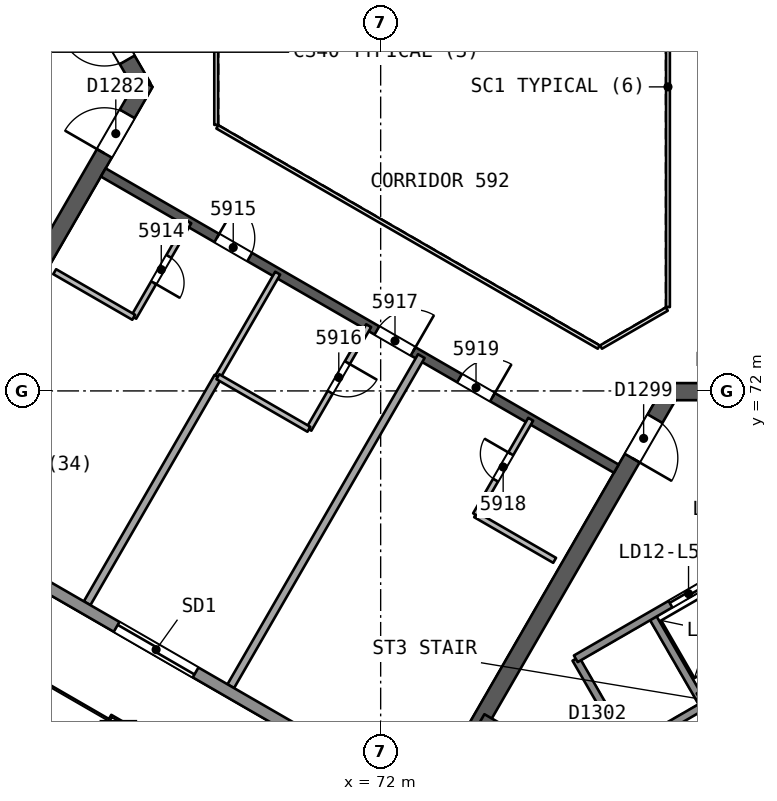
"""IFC4 building model, lengths in metres.
Left out: names, types, materials, properties, quantities, classifications, styles, units other than length and angle.
Written with IfcOpenShell. Run it as: python <this file> out.ifc"""

import sys

from ifc_helpers import new_model, si_unit, direction, frame, frame_2d, origin, origin_2d, place, context, subcontext, project, spatial, rectangle, extrude, element, fill, save


model = new_model("IFC4")
c1 = context("Model", 3, precision=1e-05, world=origin(), true_north=direction((0.0, 1.0)))
c2 = subcontext(c1, "Body", "Model", "MODEL_VIEW")
j1 = project(units=[si_unit("LENGTHUNIT", "METRE"), si_unit("PLANEANGLEUNIT", "RADIAN")], contexts=[c1])
p1 = place(None, origin())
s1 = spatial("IfcSite", under=j1, at=p1, CompositionType="ELEMENT")
p2 = place(p1, origin())
s2 = spatial("IfcBuilding", under=s1, at=p2, CompositionType="ELEMENT")
p3 = place(p2, frame((0.0, 0.0, 239.1)))
s3 = spatial("IfcBuildingStorey", under=s2, at=p3, CompositionType="ELEMENT", Elevation=239.1)
p4 = place(p3, frame((65.74, 80.0, 0.0), z_axis=(0.0, 0.0, 1.0), x_axis=(-0.499991857942, 0.866030104553, 0.0)))
e1 = element("IfcWall", 1, at=p4, inside=s3, PredefinedType="SHEAR", context=c2, shape_type="SweptSolid", body=[
    extrude(rectangle(XDim=10.25, YDim=0.45, at=frame_2d((5.125, 0.0))), origin(), (0.0, 0.0, 1.0), 3.7),
])
p5 = place(p4, frame((0.82, 0.0, 0.0)))
e2 = element("IfcOpeningElement", 2, at=p5, cuts=e1, PredefinedType="OPENING", context=c2, shape_type="SweptSolid", body=[
    extrude(rectangle(XDim=1.2, YDim=2.1, at=frame_2d((0.6, 1.05))), frame((0.0, 0.235, 0.0), z_axis=(0.0, -1.0, 0.0), x_axis=(1.0, 0.0, 0.0)), (0.0, 0.0, 1.0), 0.471),
])
p6 = place(p3, frame((60.728, 71.318, 0.0), z_axis=(0.0, 0.0, 1.0), x_axis=(0.500012416173, 0.866018235185, 0.0)))
e3 = element("IfcWall", 3, at=p6, inside=s3, PredefinedType="SHEAR", context=c2, shape_type="SweptSolid", body=[
    extrude(rectangle(XDim=10.155, YDim=0.45, at=frame_2d((5.078, 0.0))), origin(), (0.0, 0.0, 1.0), 3.7),
])
p7 = place(p6, frame((8.005, 0.0, 0.0)))
e4 = element("IfcOpeningElement", 4, at=p7, cuts=e3, PredefinedType="OPENING", context=c2, shape_type="SweptSolid", body=[
    extrude(rectangle(XDim=1.2, YDim=2.1, at=frame_2d((0.6, 1.05))), frame((0.0, 0.235, 0.0), z_axis=(0.0, -1.0, 0.0), x_axis=(1.0, 0.0, 0.0)), (0.0, 0.0, 1.0), 0.471),
])
p8 = place(p3, frame((79.63, 71.981, 0.0), z_axis=(0.0, 0.0, 1.0), x_axis=(-0.500002171595, -0.86602415001, 0.0)))
e5 = element("IfcWall", 5, at=p8, inside=s3, PredefinedType="SHEAR", context=c2, shape_type="SweptSolid", body=[
    extrude(rectangle(XDim=10.25, YDim=0.45, at=frame_2d((5.125, 0.0))), origin(), (0.0, 0.0, 1.0), 3.7),
])
p9 = place(p8, frame((0.82, 0.0, 0.0)))
e6 = element("IfcOpeningElement", 6, at=p9, cuts=e5, PredefinedType="OPENING", context=c2, shape_type="SweptSolid", body=[
    extrude(rectangle(XDim=1.2, YDim=2.1, at=frame_2d((0.6, 1.05))), frame((0.0, 0.235, 0.0), z_axis=(0.0, -1.0, 0.0), x_axis=(1.0, 0.0, 0.0)), (0.0, 0.0, 1.0), 0.471),
])
p10 = place(p3, frame((74.617, 63.299, 0.0), z_axis=(0.0, 0.0, 1.0), x_axis=(0.86602594008, -0.499999071108, 0.0)))
e7 = element("IfcWall", 7, at=p10, inside=s3, PredefinedType="SHEAR", context=c2, shape_type="SweptSolid", body=[
    extrude(rectangle(XDim=14.108, YDim=0.45, at=frame_2d((7.054, 0.0))), origin(), (0.0, 0.0, 1.0), 3.7),
])
p11 = place(p3, frame((89.655, 71.981, 0.0), z_axis=(0.0, 0.0, 1.0), x_axis=(-1.0, 0.0, 0.0)))
e8 = element("IfcWall", 8, at=p11, inside=s3, PredefinedType="SHEAR", context=c2, shape_type="SweptSolid", body=[
    extrude(rectangle(XDim=10.155, YDim=0.45, at=frame_2d((5.078, 0.0))), origin(), (0.0, 0.0, 1.0), 3.7),
])
p12 = place(p11, frame((8.005, 0.0, 0.0)))
e9 = element("IfcOpeningElement", 9, at=p12, cuts=e8, PredefinedType="OPENING", context=c2, shape_type="SweptSolid", body=[
    extrude(rectangle(XDim=1.2, YDim=2.1, at=frame_2d((0.6, 1.05))), frame((0.0, 0.235, 0.0), z_axis=(0.0, -1.0, 0.0), x_axis=(1.0, 0.0, 0.0)), (0.0, 0.0, 1.0), 0.471),
])
p13 = place(p3, frame((64.7, 77.748, 0.0), z_axis=(0.0, 0.0, 1.0), x_axis=(0.866026492143, -0.499998114903, 0.0)))
e10 = element("IfcWall", 10, at=p13, inside=s3, PredefinedType="SHEAR", context=c2, shape_type="SweptSolid", body=[
    extrude(rectangle(XDim=15.588, YDim=0.25, at=frame_2d((7.794, 0.0))), origin(), (0.0, 0.0, 1.0), 3.3),
])
p14 = place(p13, frame((3.45, 0.0, 0.0)))
e11 = element("IfcOpeningElement", 11, at=p14, cuts=e10, PredefinedType="OPENING", context=c2, shape_type="SweptSolid", body=[
    extrude(rectangle(XDim=1.0, YDim=2.1, at=frame_2d((0.5, 1.05))), frame((0.0, 0.135, 0.0), z_axis=(0.0, -1.0, 0.0), x_axis=(1.0, 0.0, 0.0)), (0.0, 0.0, 1.0), 0.271),
])
p15 = place(p13, frame((8.315, 0.0, 0.0)))
e12 = element("IfcOpeningElement", 12, at=p15, cuts=e10, PredefinedType="OPENING", context=c2, shape_type="SweptSolid", body=[
    extrude(rectangle(XDim=1.1, YDim=2.1, at=frame_2d((0.55, 1.05))), frame((0.0, 0.135, 0.0), z_axis=(0.0, -1.0, 0.0), x_axis=(1.0, 0.0, 0.0)), (0.0, 0.0, 1.0), 0.271),
])
p16 = place(p13, frame((10.827, 0.0, 0.0)))
e13 = element("IfcOpeningElement", 13, at=p16, cuts=e10, PredefinedType="OPENING", context=c2, shape_type="SweptSolid", body=[
    extrude(rectangle(XDim=1.0, YDim=2.1, at=frame_2d((0.5, 1.05))), frame((0.0, 0.135, 0.0), z_axis=(0.0, -1.0, 0.0), x_axis=(1.0, 0.0, 0.0)), (0.0, 0.0, 1.0), 0.271),
])
p17 = place(p3, frame((65.086, 62.828, 0.0), z_axis=(0.010093620709, 0.017482414954, 0.999796221231), x_axis=(-0.866022643586, 0.500004780773, 1.3036e-08)))
e14 = element("IfcColumn", 14, at=p17, inside=s3, PredefinedType="COLUMN", context=c2, shape_type="SweptSolid", body=[
    extrude(rectangle(XDim=0.85, YDim=0.85, at=origin_2d()), origin(), (0.0, 0.0, 1.0), 3.701),
])
p18 = place(p3, frame((66.952, 76.448, 0.0), z_axis=(0.0, 0.0, 1.0), x_axis=(-0.499987231761, -0.866032775405, 0.0)))
e15 = element("IfcWall", 15, at=p18, inside=s3, PredefinedType="PARTITIONING", context=c2, shape_type="SweptSolid", body=[
    extrude(rectangle(XDim=2.9, YDim=0.15, at=frame_2d((1.45, 0.0))), origin(), (0.0, 0.0, 1.0), 3.3),
])
p19 = place(p18, frame((1.05, 0.0, 0.0)))
e16 = element("IfcOpeningElement", 16, at=p19, cuts=e15, PredefinedType="OPENING", context=c2, shape_type="SweptSolid", body=[
    extrude(rectangle(XDim=0.8, YDim=2.1, at=frame_2d((0.4, 1.05))), frame((0.0, 0.085, 0.0), z_axis=(0.0, -1.0, 0.0), x_axis=(1.0, 0.0, 0.0)), (0.0, 0.0, 1.0), 0.171),
])
p20 = place(p3, frame((65.502, 73.937, 0.0), z_axis=(0.0, 0.0, 1.0), x_axis=(-0.865994240961, 0.500053971709, 0.0)))
e17 = element("IfcWall", 17, at=p20, inside=s3, PredefinedType="PARTITIONING", context=c2, shape_type="SweptSolid", body=[
    extrude(rectangle(XDim=2.401, YDim=0.15, at=frame_2d((1.201, 0.0))), origin(), (0.0, 0.0, 1.0), 3.3),
])
p21 = place(p3, frame((64.275, 66.413, 0.0), z_axis=(0.0, 0.0, 1.0), x_axis=(0.500015178307, 0.866016640408, 0.0)))
e18 = element("IfcWall", 18, at=p21, inside=s3, PredefinedType="PARTITIONING", context=c2, shape_type="SweptSolid", body=[
    extrude(rectangle(XDim=6.883, YDim=0.2, at=frame_2d((3.441, 0.0))), origin(), (0.0, 0.0, 1.0), 3.3),
])
p22 = place(p3, frame((67.717, 72.373, 0.0), z_axis=(0.0, 0.0, 1.0), x_axis=(0.500002266011, 0.866024095498, 0.0)))
e19 = element("IfcWall", 19, at=p22, inside=s3, PredefinedType="PARTITIONING", context=c2, shape_type="SweptSolid", body=[
    extrude(rectangle(XDim=3.147, YDim=0.15, at=frame_2d((1.573, 0.0))), origin(), (0.0, 0.0, 1.0), 3.3),
])
p23 = place(p3, frame((71.684, 73.716, 0.0), z_axis=(0.0, 0.0, 1.0), x_axis=(-0.499977671647, -0.866038294681, 0.0)))
e20 = element("IfcWall", 20, at=p23, inside=s3, PredefinedType="PARTITIONING", context=c2, shape_type="SweptSolid", body=[
    extrude(rectangle(XDim=3.147, YDim=0.15, at=frame_2d((1.573, 0.0))), origin(), (0.0, 0.0, 1.0), 3.3),
])
p24 = place(p23, frame((1.123, 0.0, 0.0)))
e21 = element("IfcOpeningElement", 21, at=p24, cuts=e20, PredefinedType="OPENING", context=c2, shape_type="SweptSolid", body=[
    extrude(rectangle(XDim=0.9, YDim=2.1, at=frame_2d((0.45, 1.05))), frame((0.0, 0.085, 0.0), z_axis=(0.0, -1.0, 0.0), x_axis=(1.0, 0.0, 0.0)), (0.0, 0.0, 1.0), 0.171),
])
p25 = place(p3, frame((70.111, 70.991, 0.0), z_axis=(0.0, 0.0, 1.0), x_axis=(-0.866050310653, 0.499956857557, 0.0)))
e22 = element("IfcWall", 22, at=p25, inside=s3, PredefinedType="PARTITIONING", context=c2, shape_type="SweptSolid", body=[
    extrude(rectangle(XDim=2.765, YDim=0.15, at=frame_2d((1.382, 0.0))), origin(), (0.0, 0.0, 1.0), 3.3),
])
p26 = place(p3, frame((68.055, 64.23, 0.0), z_axis=(0.0, 0.0, 1.0), x_axis=(0.50001112685, 0.866018979599, 0.0)))
e23 = element("IfcWall", 23, at=p26, inside=s3, PredefinedType="PARTITIONING", context=c2, shape_type="SweptSolid", body=[
    extrude(rectangle(XDim=10.03, YDim=0.2, at=frame_2d((5.015, 0.0))), origin(), (0.0, 0.0, 1.0), 3.3),
])
p27 = place(p3, frame((76.578, 67.542, 0.0), z_axis=(0.0, 0.0, 1.0), x_axis=(-0.866038271014, 0.499977712642, 0.0)))
e24 = element("IfcWall", 24, at=p27, inside=s3, PredefinedType="PARTITIONING", context=c2, shape_type="SweptSolid", body=[
    extrude(rectangle(XDim=2.401, YDim=0.15, at=frame_2d((1.2, 0.0))), origin(), (0.0, 0.0, 1.0), 3.3),
])
p28 = place(p3, frame((74.498, 68.743, 0.0), z_axis=(0.0, 0.0, 1.0), x_axis=(0.499987231761, 0.866032775405, 0.0)))
e25 = element("IfcWall", 25, at=p28, inside=s3, PredefinedType="PARTITIONING", context=c2, shape_type="SweptSolid", body=[
    extrude(rectangle(XDim=2.9, YDim=0.15, at=frame_2d((1.45, 0.0))), origin(), (0.0, 0.0, 1.0), 3.3),
])
p29 = place(p28, frame((1.05, 0.0, 0.0)))
e26 = element("IfcOpeningElement", 26, at=p29, cuts=e25, PredefinedType="OPENING", context=c2, shape_type="SweptSolid", body=[
    extrude(rectangle(XDim=0.8, YDim=2.1, at=frame_2d((0.4, 1.05))), frame((0.0, 0.085, 0.0), z_axis=(0.0, -1.0, 0.0), x_axis=(1.0, 0.0, 0.0)), (0.0, 0.0, 1.0), 0.171),
])
p30 = place(p3, frame((87.876, 52.614, 0.0), z_axis=(0.0, 0.0, 1.0), x_axis=(-0.866025459945, 0.499999902727, 0.0)))
e27 = element("IfcWall", 27, at=p30, inside=s3, PredefinedType="SOLIDWALL", context=c2, shape_type="SweptSolid", body=[
    extrude(rectangle(XDim=49.688, YDim=0.3, at=frame_2d((24.844, 0.0))), origin(), (0.0, 0.0, 1.0), 3.3),
])
p31 = place(p30, frame((23.956, 0.0, 0.0)))
e28 = element("IfcOpeningElement", 28, at=p31, cuts=e27, PredefinedType="OPENING", context=c2, shape_type="SweptSolid", body=[
    extrude(rectangle(XDim=2.4, YDim=2.4, at=frame_2d((1.2, 1.2))), frame((0.0, 0.161, 0.0), z_axis=(0.0, -1.0, 0.0), x_axis=(1.0, 0.0, 0.0)), (0.0, 0.0, 1.0), 0.321),
])
p32 = place(p30, frame((37.357, 0.0, 0.0)))
e29 = element("IfcOpeningElement", 29, at=p32, cuts=e27, PredefinedType="OPENING", context=c2, shape_type="SweptSolid", body=[
    extrude(rectangle(XDim=2.4, YDim=2.4, at=frame_2d((1.2, 1.2))), frame((0.0, 0.161, 0.0), z_axis=(0.0, -1.0, 0.0), x_axis=(1.0, 0.0, 0.0)), (0.0, 0.0, 1.0), 0.321),
])
p33 = place(p30, frame((10.243, 0.0, 0.0)))
e30 = element("IfcOpeningElement", 30, at=p33, cuts=e27, PredefinedType="OPENING", context=c2, shape_type="SweptSolid", body=[
    extrude(rectangle(XDim=2.4, YDim=2.4, at=frame_2d((1.2, 1.2))), frame((0.0, 0.161, 0.0), z_axis=(0.0, -1.0, 0.0), x_axis=(1.0, 0.0, 0.0)), (0.0, 0.0, 1.0), 0.321),
])
for number, where, z_axis, x_axis in (
    (31, (77.135, 64.952, 0.0), (0.0, 0.0, 1.0), (0.5, -0.866, 0.0)),
    (32, (79.127, 66.102, 0.0), (0.0, 0.0, 1.0), (0.5, -0.866, 0.0)),
):
    element("IfcWall", number, at=place(p3, frame(where, z_axis=z_axis, x_axis=x_axis)), inside=s3, PredefinedType="SOLIDWALL", context=c2, shape_type="SweptSolid", body=[
        extrude(rectangle(XDim=2.75, YDim=0.2, at=frame_2d((1.375, 0.0))), origin(), (0.0, 0.0, 1.0), 3.3),
    ])
p34 = place(p3, frame((77.135, 64.952, 0.0), z_axis=(0.0, 0.0, 1.0), x_axis=(0.866031916153, 0.499988720078, 0.0)))
e33 = element("IfcWall", 33, at=p34, inside=s3, PredefinedType="SOLIDWALL", context=c2, shape_type="SweptSolid", body=[
    extrude(rectangle(XDim=11.35, YDim=0.2, at=frame_2d((5.675, 0.0))), origin(), (0.0, 0.0, 1.0), 3.3),
])
p35 = place(p34, frame((2.875, 0.0, 0.0)))
e34 = element("IfcOpeningElement", 34, at=p35, cuts=e33, PredefinedType="OPENING", context=c2, shape_type="SweptSolid", body=[
    extrude(rectangle(XDim=1.1, YDim=2.1, at=frame_2d((0.55, 1.05))), frame((0.0, 0.11, 0.0), z_axis=(0.0, -1.0, 0.0), x_axis=(1.0, 0.0, 0.0)), (0.0, 0.0, 1.0), 0.221),
])
p36 = place(p34, frame((5.125, 0.0, 0.0)))
e35 = element("IfcOpeningElement", 35, at=p36, cuts=e33, PredefinedType="OPENING", context=c2, shape_type="SweptSolid", body=[
    extrude(rectangle(XDim=1.1, YDim=2.1, at=frame_2d((0.55, 1.05))), frame((0.0, 0.11, 0.0), z_axis=(0.0, -1.0, 0.0), x_axis=(1.0, 0.0, 0.0)), (0.0, 0.0, 1.0), 0.221),
])
p37 = place(p34, frame((7.375, 0.0, 0.0)))
e36 = element("IfcOpeningElement", 36, at=p37, cuts=e33, PredefinedType="OPENING", context=c2, shape_type="SweptSolid", body=[
    extrude(rectangle(XDim=1.1, YDim=2.1, at=frame_2d((0.55, 1.05))), frame((0.0, 0.11, 0.0), z_axis=(0.0, -1.0, 0.0), x_axis=(1.0, 0.0, 0.0)), (0.0, 0.0, 1.0), 0.221),
])
p38 = place(p3, frame((80.367, 63.954, 0.0), z_axis=(0.0, 0.0, 1.0), x_axis=(0.866026575979, 0.499997969693, 0.0)))
e37 = element("IfcWall", 37, at=p38, inside=s3, PredefinedType="SOLIDWALL", context=c2, shape_type="SweptSolid", body=[
    extrude(rectangle(XDim=6.75, YDim=0.2, at=frame_2d((3.375, 0.0))), origin(), (0.0, 0.0, 1.0), 3.3),
])
p39 = place(p3, frame((78.51, 62.57, 0.0), z_axis=(0.0, 0.0, 1.0), x_axis=(0.866053019151, 0.499952165731, 0.0)))
e38 = element("IfcWall", 38, at=p39, inside=s3, PredefinedType="SOLIDWALL", context=c2, shape_type="SweptSolid", body=[
    extrude(rectangle(XDim=2.3, YDim=0.2, at=frame_2d((1.15, 0.0))), origin(), (0.0, 0.0, 1.0), 3.3),
])
p40 = place(p3, frame((79.56, 74.206, 0.0), z_axis=(0.0, 0.0, 1.0), x_axis=(0.0, 1.0, 0.0)))
e39 = element("IfcWall", 39, at=p40, inside=s3, PredefinedType="PARTITIONING", context=c2, shape_type="SweptSolid", body=[
    extrude(rectangle(XDim=11.588, YDim=0.1, at=frame_2d((5.794, 0.0))), origin(), (0.0, 0.0, 1.0), 3.3),
])
p41 = place(p3, frame((67.672, 81.0, 0.0), z_axis=(0.0, 0.0, 1.0), x_axis=(0.0, -1.0, 0.0)))
e40 = element("IfcWall", 40, at=p41, inside=s3, PredefinedType="PARTITIONING", context=c2, shape_type="SweptSolid", body=[
    extrude(rectangle(XDim=2.0, YDim=0.1, at=frame_2d((1.0, 0.0))), origin(), (0.0, 0.0, 1.0), 3.3),
])
p42 = place(p3, frame((67.702, 78.948, 0.0), z_axis=(0.0, 0.0, 1.0), x_axis=(0.866026658274, -0.499997827154, 0.0)))
e41 = element("IfcWall", 41, at=p42, inside=s3, PredefinedType="PARTITIONING", context=c2, shape_type="SweptSolid", body=[
    extrude(rectangle(XDim=11.588, YDim=0.1, at=frame_2d((5.794, 0.0))), origin(), (0.0, 0.0, 1.0), 3.3),
])
p43 = place(p3, frame((77.798, 73.154, 0.0), z_axis=(0.0, 0.0, 1.0), x_axis=(0.866041268327, 0.499972520799, 0.0)))
e42 = element("IfcWall", 42, at=p43, inside=s3, PredefinedType="PARTITIONING", context=c2, shape_type="SweptSolid", body=[
    extrude(rectangle(XDim=2.0, YDim=0.1, at=frame_2d((1.0, 0.0))), origin(), (0.0, 0.0, 1.0), 3.3),
])
p44 = place(p19, origin())
e43 = element("IfcDoor", 43, at=p44, inside=s3, OperationType="SINGLE_SWING_RIGHT", PredefinedType="NOTDEFINED", context=c2, shape_type="SweptSolid", body=[
    extrude(rectangle(XDim=0.8, YDim=2.1, at=frame_2d((0.4, 1.05))), frame((0.0, 0.025, 0.0), z_axis=(0.0, -1.0, 0.0), x_axis=(1.0, 0.0, 0.0)), (0.0, 0.0, 1.0), 0.05),
])
fill(e16, e43)
p45 = place(p14, origin())
e44 = element("IfcDoor", 44, at=p45, inside=s3, OperationType="SINGLE_SWING_LEFT", PredefinedType="NOTDEFINED", context=c2, shape_type="SweptSolid", body=[
    extrude(rectangle(XDim=1.0, YDim=2.1, at=frame_2d((0.5, 1.05))), frame((0.0, 0.025, 0.0), z_axis=(0.0, -1.0, 0.0), x_axis=(1.0, 0.0, 0.0)), (0.0, 0.0, 1.0), 0.05),
])
fill(e11, e44)
p46 = place(p24, origin())
e45 = element("IfcDoor", 45, at=p46, inside=s3, OperationType="SINGLE_SWING_LEFT", PredefinedType="NOTDEFINED", context=c2, shape_type="SweptSolid", body=[
    extrude(rectangle(XDim=0.9, YDim=2.1, at=frame_2d((0.45, 1.05))), frame((0.0, 0.025, 0.0), z_axis=(0.0, -1.0, 0.0), x_axis=(1.0, 0.0, 0.0)), (0.0, 0.0, 1.0), 0.05),
])
fill(e21, e45)
p47 = place(p15, origin())
e46 = element("IfcDoor", 46, at=p47, inside=s3, OperationType="SINGLE_SWING_RIGHT", PredefinedType="NOTDEFINED", context=c2, shape_type="SweptSolid", body=[
    extrude(rectangle(XDim=1.1, YDim=2.1, at=frame_2d((0.55, 1.05))), frame((0.0, 0.025, 0.0), z_axis=(0.0, -1.0, 0.0), x_axis=(1.0, 0.0, 0.0)), (0.0, 0.0, 1.0), 0.05),
])
fill(e12, e46)
p48 = place(p29, origin())
e47 = element("IfcDoor", 47, at=p48, inside=s3, OperationType="SINGLE_SWING_RIGHT", PredefinedType="NOTDEFINED", context=c2, shape_type="SweptSolid", body=[
    extrude(rectangle(XDim=0.8, YDim=2.1, at=frame_2d((0.4, 1.05))), frame((0.0, 0.025, 0.0), z_axis=(0.0, -1.0, 0.0), x_axis=(1.0, 0.0, 0.0)), (0.0, 0.0, 1.0), 0.05),
])
fill(e26, e47)
p49 = place(p16, origin())
e48 = element("IfcDoor", 48, at=p49, inside=s3, OperationType="SINGLE_SWING_RIGHT", PredefinedType="NOTDEFINED", context=c2, shape_type="SweptSolid", body=[
    extrude(rectangle(XDim=1.0, YDim=2.1, at=frame_2d((0.5, 1.05))), frame((0.0, 0.025, 0.0), z_axis=(0.0, -1.0, 0.0), x_axis=(1.0, 0.0, 0.0)), (0.0, 0.0, 1.0), 0.05),
])
fill(e13, e48)
p50 = place(p31, origin())
e49 = element("IfcDoor", 49, at=p50, inside=s3, OperationType="SLIDING_TO_LEFT", PredefinedType="NOTDEFINED", context=c2, shape_type="SweptSolid", body=[
    extrude(rectangle(XDim=2.4, YDim=2.4, at=frame_2d((1.2, 1.2))), frame((0.0, 0.025, 0.0), z_axis=(0.0, -1.0, 0.0), x_axis=(1.0, 0.0, 0.0)), (0.0, 0.0, 1.0), 0.05),
])
fill(e28, e49)
p51 = place(p5, origin())
e50 = element("IfcDoor", 50, at=p51, inside=s3, OperationType="SINGLE_SWING_RIGHT", PredefinedType="NOTDEFINED", context=c2, shape_type="SweptSolid", body=[
    extrude(rectangle(XDim=1.2, YDim=2.1, at=frame_2d((0.6, 1.05))), frame((0.0, 0.025, 0.0), z_axis=(0.0, -1.0, 0.0), x_axis=(1.0, 0.0, 0.0)), (0.0, 0.0, 1.0), 0.05),
])
fill(e2, e50)
p52 = place(p7, origin())
e51 = element("IfcDoor", 51, at=p52, inside=s3, OperationType="SINGLE_SWING_LEFT", PredefinedType="NOTDEFINED", context=c2, shape_type="SweptSolid", body=[
    extrude(rectangle(XDim=1.2, YDim=2.1, at=frame_2d((0.6, 1.05))), frame((0.0, 0.025, 0.0), z_axis=(0.0, -1.0, 0.0), x_axis=(1.0, 0.0, 0.0)), (0.0, 0.0, 1.0), 0.05),
])
fill(e4, e51)
p53 = place(p9, origin())
e52 = element("IfcDoor", 52, at=p53, inside=s3, OperationType="SINGLE_SWING_RIGHT", PredefinedType="NOTDEFINED", context=c2, shape_type="SweptSolid", body=[
    extrude(rectangle(XDim=1.2, YDim=2.1, at=frame_2d((0.6, 1.05))), frame((0.0, 0.025, 0.0), z_axis=(0.0, -1.0, 0.0), x_axis=(1.0, 0.0, 0.0)), (0.0, 0.0, 1.0), 0.05),
])
fill(e6, e52)
p54 = place(p35, origin())
e53 = element("IfcDoor", 53, at=p54, inside=s3, OperationType="SLIDING_TO_LEFT", PredefinedType="NOTDEFINED", context=c2, shape_type="SweptSolid", body=[
    extrude(rectangle(XDim=1.1, YDim=2.1, at=frame_2d((0.55, 1.05))), frame((0.0, 0.025, 0.0), z_axis=(0.0, -1.0, 0.0), x_axis=(1.0, 0.0, 0.0)), (0.0, 0.0, 1.0), 0.05),
])
fill(e34, e53)
save(model, sys.argv[1])
